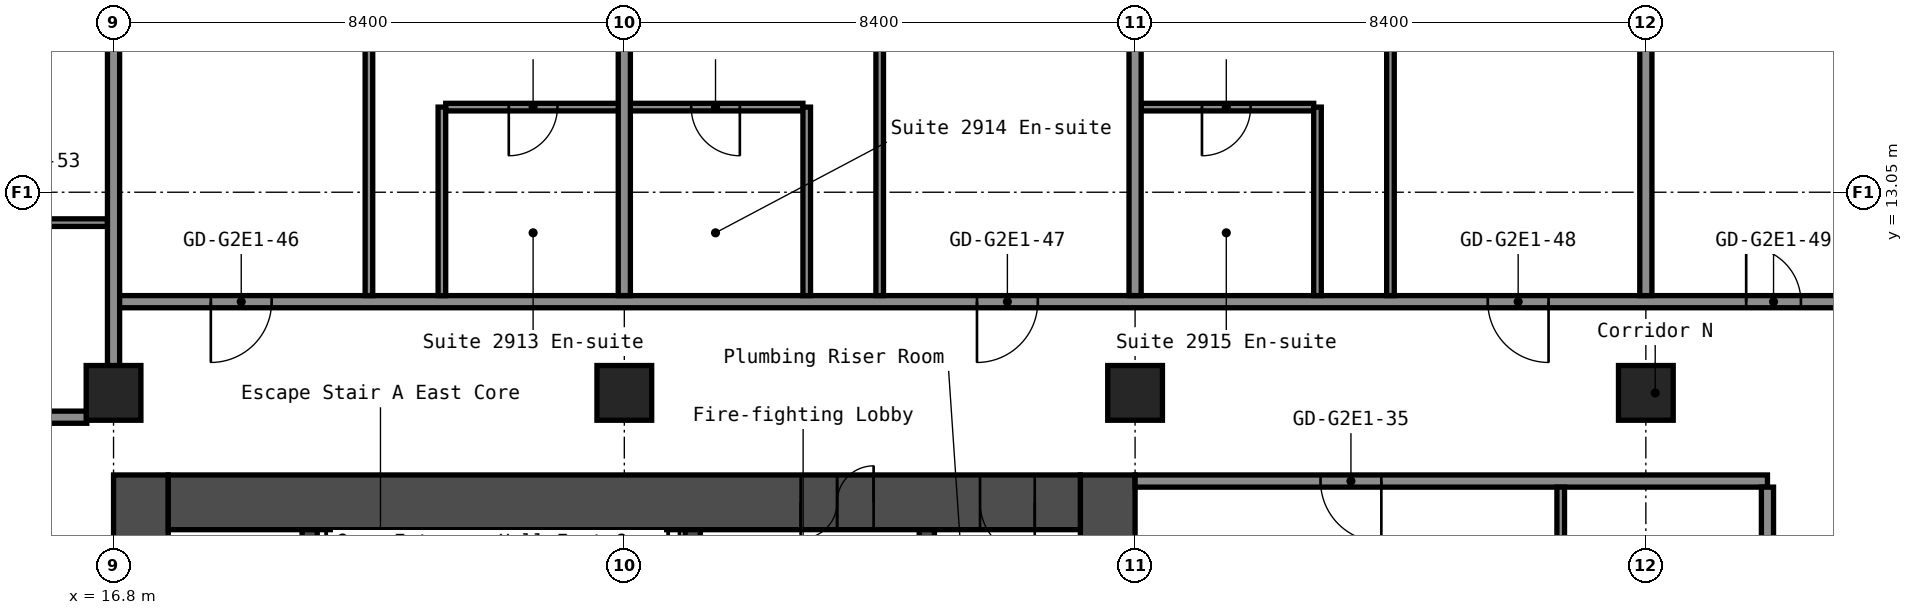
"""IFC4 building model, lengths in metres.
Left out: names, types, materials, properties, quantities, classifications, styles, units other than length and angle.
Written with IfcOpenShell. Run it as: python <this file> out.ifc"""

import sys

from ifc_helpers import new_model, si_unit, direction, frame, frame_2d, origin, origin_2d, place, context, subcontext, project, spatial, rectangle, hollow_rectangle, extrude, element, fill, save


model = new_model("IFC4")
c1 = context("Model", 3, precision=1e-05, world=origin(), true_north=direction((0.0, 1.0)))
c2 = subcontext(c1, "Body", "Model", "MODEL_VIEW")
j1 = project(units=[si_unit("LENGTHUNIT", "METRE"), si_unit("PLANEANGLEUNIT", "RADIAN")], contexts=[c1])
p1 = place(None, origin())
s1 = spatial("IfcSite", under=j1, at=p1, CompositionType="ELEMENT")
p2 = place(p1, origin())
s2 = spatial("IfcBuilding", under=s1, at=p2, CompositionType="ELEMENT")
p3 = place(p2, frame((0.0, 0.0, 104.2)))
s3 = spatial("IfcBuildingStorey", under=s2, at=p3, CompositionType="ELEMENT", Elevation=104.2)
for number, where, z_axis, x_axis in (
    (1, (16.8, 9.75, 0.0), (0.0, 0.0, 1.0), (1.0, 0.0, 0.0)),
    (2, (25.2, 9.75, 0.0), (0.0, 0.0, 1.0), (1.0, 0.0, 0.0)),
    (3, (33.6, 9.75, 0.0), (0.0, 0.0, 1.0), (1.0, 0.0, 0.0)),
    (4, (42.0, 9.75, 0.0), (0.0, 0.0, 1.0), (1.0, 0.0, 0.0)),
):
    element("IfcColumn", number, at=place(p3, frame(where, z_axis=z_axis, x_axis=x_axis)), inside=s3, PredefinedType="COLUMN", context=c2, shape_type="SweptSolid", body=[
        extrude(hollow_rectangle(XDim=0.9, YDim=0.9, WallThickness=0.036, at=origin_2d()), origin(), (0.0, 0.0, 1.0), 2.8),
    ])
p4 = place(p3, frame((17.25, -8.4, 0.0), z_axis=(0.0, 0.0, 1.0), x_axis=(0.0, 1.0, 0.0)))
e5 = element("IfcWall", 5, at=p4, inside=s3, PredefinedType="SHEAR", context=c2, shape_type="SweptSolid", body=[
    extrude(rectangle(XDim=16.8, YDim=0.9, at=frame_2d((8.4, 0.0))), origin(), (0.0, 0.0, 1.0), 2.8),
])
p5 = place(p4, frame((7.6, 0.0, 0.0)))
e6 = element("IfcOpeningElement", 6, at=p5, cuts=e5, PredefinedType="OPENING", context=c2, shape_type="SweptSolid", body=[
    extrude(rectangle(XDim=1.2, YDim=2.1, at=frame_2d((0.6, 1.05))), frame((0.0, 0.46, 0.0), z_axis=(0.0, -1.0, 0.0), x_axis=(1.0, 0.0, 0.0)), (0.0, 0.0, 1.0), 0.92),
])
p6 = place(p3, frame((33.15, -8.4, 0.0), z_axis=(0.0, 0.0, 1.0), x_axis=(0.0, 1.0, 0.0)))
e7 = element("IfcWall", 7, at=p6, inside=s3, PredefinedType="SHEAR", context=c2, shape_type="SweptSolid", body=[
    extrude(rectangle(XDim=16.8, YDim=0.9, at=frame_2d((8.4, 0.0))), origin(), (0.0, 0.0, 1.0), 2.8),
])
p7 = place(p3, frame((17.7, 7.95, 0.0), z_axis=(0.0, 0.0, 1.0), x_axis=(1.0, 0.0, 0.0)))
e8 = element("IfcWall", 8, at=p7, inside=s3, PredefinedType="SHEAR", context=c2, shape_type="SweptSolid", body=[
    extrude(rectangle(XDim=15.0, YDim=0.9, at=frame_2d((7.5, 0.0))), origin(), (0.0, 0.0, 1.0), 2.8),
])
p8 = place(p7, frame((10.4, 0.0, 0.0)))
e9 = element("IfcOpeningElement", 9, at=p8, cuts=e8, PredefinedType="OPENING", context=c2, shape_type="SweptSolid", body=[
    extrude(rectangle(XDim=1.2, YDim=2.1, at=frame_2d((0.6, 1.05))), frame((0.0, 0.46, 0.0), z_axis=(0.0, -1.0, 0.0), x_axis=(1.0, 0.0, 0.0)), (0.0, 0.0, 1.0), 0.92),
])
p9 = place(p7, frame((13.35, 0.0, 0.0)))
e10 = element("IfcOpeningElement", 10, at=p9, cuts=e8, PredefinedType="OPENING", context=c2, shape_type="SweptSolid", body=[
    extrude(rectangle(XDim=0.9, YDim=2.1, at=frame_2d((0.45, 1.05))), frame((0.0, 0.46, 0.0), z_axis=(0.0, -1.0, 0.0), x_axis=(1.0, 0.0, 0.0)), (0.0, 0.0, 1.0), 0.92),
])
p10 = place(p3, frame((20.025, 1.2, 0.0), z_axis=(0.0, 0.0, 1.0), x_axis=(0.0, 1.0, 0.0)))
e11 = element("IfcWall", 11, at=p10, inside=s3, PredefinedType="SHEAR", context=c2, shape_type="SweptSolid", body=[
    extrude(rectangle(XDim=6.3, YDim=0.25, at=frame_2d((3.15, 0.0))), origin(), (0.0, 0.0, 1.0), 2.8),
])
p11 = place(p3, frame((26.325, 3.75, 0.0), z_axis=(0.0, 0.0, 1.0), x_axis=(0.0, 1.0, 0.0)))
e12 = element("IfcWall", 12, at=p11, inside=s3, PredefinedType="SHEAR", context=c2, shape_type="SweptSolid", body=[
    extrude(rectangle(XDim=3.75, YDim=0.25, at=frame_2d((1.875, 0.0))), origin(), (0.0, 0.0, 1.0), 2.8),
])
p12 = place(p11, frame((1.25, 0.0, 0.0)))
e13 = element("IfcOpeningElement", 13, at=p12, cuts=e12, PredefinedType="OPENING", context=c2, shape_type="SweptSolid", body=[
    extrude(rectangle(XDim=1.2, YDim=2.1, at=frame_2d((0.6, 1.05))), frame((0.0, 0.135, 0.0), z_axis=(0.0, -1.0, 0.0), x_axis=(1.0, 0.0, 0.0)), (0.0, 0.0, 1.0), 0.27),
])
p13 = place(p3, frame((30.175, 1.45, 0.0), z_axis=(0.0, 0.0, 1.0), x_axis=(0.0, 1.0, 0.0)))
e14 = element("IfcWall", 14, at=p13, inside=s3, PredefinedType="SHEAR", context=c2, shape_type="SweptSolid", body=[
    extrude(rectangle(XDim=6.05, YDim=0.25, at=frame_2d((3.025, 0.0))), origin(), (0.0, 0.0, 1.0), 2.8),
])
p14 = place(p13, frame((2.625, 0.0, 0.0)))
e15 = element("IfcOpeningElement", 15, at=p14, cuts=e14, PredefinedType="OPENING", context=c2, shape_type="SweptSolid", body=[
    extrude(rectangle(XDim=1.1, YDim=2.1, at=frame_2d((0.55, 1.05))), frame((0.0, 0.135, 0.0), z_axis=(0.0, -1.0, 0.0), x_axis=(1.0, 0.0, 0.0)), (0.0, 0.0, 1.0), 0.27),
])
p15 = place(p3, frame((33.6, 8.3, 0.0), z_axis=(0.0, 0.0, 1.0), x_axis=(1.0, 0.0, 0.0)))
e16 = element("IfcWall", 16, at=p15, inside=s3, PredefinedType="PARTITIONING", context=c2, shape_type="SweptSolid", body=[
    extrude(rectangle(XDim=10.4, YDim=0.2, at=frame_2d((5.2, 0.0))), origin(), (0.0, 0.0, 1.0), 2.8),
])
p16 = place(p15, frame((3.05, 0.0, 0.0)))
e17 = element("IfcOpeningElement", 17, at=p16, cuts=e16, PredefinedType="OPENING", context=c2, shape_type="SweptSolid", body=[
    extrude(rectangle(XDim=1.0, YDim=2.1, at=frame_2d((0.5, 1.05))), frame((0.0, 0.11, 0.0), z_axis=(0.0, -1.0, 0.0), x_axis=(1.0, 0.0, 0.0)), (0.0, 0.0, 1.0), 0.22),
])
p17 = place(p3, frame((-16.36, 9.35, 0.0), z_axis=(0.0, 0.0, 1.0), x_axis=(1.0, 0.0, 0.0)))
e18 = element("IfcWall", 18, at=p17, inside=s3, PredefinedType="PARTITIONING", context=c2, shape_type="SweptSolid", body=[
    extrude(rectangle(XDim=32.72, YDim=0.2, at=frame_2d((16.36, 0.0))), origin(), (0.0, 0.0, 1.0), 2.8),
])
p18 = place(p17, frame((5.36, 0.0, 0.0)))
e19 = element("IfcOpeningElement", 19, at=p18, cuts=e18, PredefinedType="OPENING", context=c2, shape_type="SweptSolid", body=[
    extrude(rectangle(XDim=1.0, YDim=2.1, at=frame_2d((0.5, 1.05))), frame((0.0, 0.11, 0.0), z_axis=(0.0, -1.0, 0.0), x_axis=(1.0, 0.0, 0.0)), (0.0, 0.0, 1.0), 0.22),
])
p19 = place(p17, frame((13.76, 0.0, 0.0)))
e20 = element("IfcOpeningElement", 20, at=p19, cuts=e18, PredefinedType="OPENING", context=c2, shape_type="SweptSolid", body=[
    extrude(rectangle(XDim=1.0, YDim=2.1, at=frame_2d((0.5, 1.05))), frame((0.0, 0.11, 0.0), z_axis=(0.0, -1.0, 0.0), x_axis=(1.0, 0.0, 0.0)), (0.0, 0.0, 1.0), 0.22),
])
p20 = place(p17, frame((22.16, 0.0, 0.0)))
e21 = element("IfcOpeningElement", 21, at=p20, cuts=e18, PredefinedType="OPENING", context=c2, shape_type="SweptSolid", body=[
    extrude(rectangle(XDim=1.0, YDim=2.1, at=frame_2d((0.5, 1.05))), frame((0.0, 0.11, 0.0), z_axis=(0.0, -1.0, 0.0), x_axis=(1.0, 0.0, 0.0)), (0.0, 0.0, 1.0), 0.22),
])
p21 = place(p17, frame((26.36, 0.0, 0.0)))
e22 = element("IfcOpeningElement", 22, at=p21, cuts=e18, PredefinedType="OPENING", context=c2, shape_type="SweptSolid", body=[
    extrude(rectangle(XDim=1.0, YDim=2.1, at=frame_2d((0.5, 1.05))), frame((0.0, 0.11, 0.0), z_axis=(0.0, -1.0, 0.0), x_axis=(1.0, 0.0, 0.0)), (0.0, 0.0, 1.0), 0.22),
])
p22 = place(p3, frame((16.8, 11.25, 0.0), z_axis=(0.0, 0.0, 1.0), x_axis=(1.0, 0.0, 0.0)))
e23 = element("IfcWall", 23, at=p22, inside=s3, PredefinedType="PARTITIONING", context=c2, shape_type="SweptSolid", body=[
    extrude(rectangle(XDim=29.7, YDim=0.2, at=frame_2d((14.85, 0.0))), origin(), (0.0, 0.0, 1.0), 2.8),
])
p23 = place(p22, frame((1.6, 0.0, 0.0)))
e24 = element("IfcOpeningElement", 24, at=p23, cuts=e23, PredefinedType="OPENING", context=c2, shape_type="SweptSolid", body=[
    extrude(rectangle(XDim=1.0, YDim=2.1, at=frame_2d((0.5, 1.05))), frame((0.0, 0.11, 0.0), z_axis=(0.0, -1.0, 0.0), x_axis=(1.0, 0.0, 0.0)), (0.0, 0.0, 1.0), 0.22),
])
p24 = place(p22, frame((14.2, 0.0, 0.0)))
e25 = element("IfcOpeningElement", 25, at=p24, cuts=e23, PredefinedType="OPENING", context=c2, shape_type="SweptSolid", body=[
    extrude(rectangle(XDim=1.0, YDim=2.1, at=frame_2d((0.5, 1.05))), frame((0.0, 0.11, 0.0), z_axis=(0.0, -1.0, 0.0), x_axis=(1.0, 0.0, 0.0)), (0.0, 0.0, 1.0), 0.22),
])
p25 = place(p22, frame((22.6, 0.0, 0.0)))
e26 = element("IfcOpeningElement", 26, at=p25, cuts=e23, PredefinedType="OPENING", context=c2, shape_type="SweptSolid", body=[
    extrude(rectangle(XDim=1.0, YDim=2.1, at=frame_2d((0.5, 1.05))), frame((0.0, 0.11, 0.0), z_axis=(0.0, -1.0, 0.0), x_axis=(1.0, 0.0, 0.0)), (0.0, 0.0, 1.0), 0.22),
])
p26 = place(p22, frame((26.85, 0.0, 0.0)))
e27 = element("IfcOpeningElement", 27, at=p26, cuts=e23, PredefinedType="OPENING", context=c2, shape_type="SweptSolid", body=[
    extrude(rectangle(XDim=0.9, YDim=2.1, at=frame_2d((0.45, 1.05))), frame((0.0, 0.11, 0.0), z_axis=(0.0, -1.0, 0.0), x_axis=(1.0, 0.0, 0.0)), (0.0, 0.0, 1.0), 0.22),
])
p27 = place(p3, frame((13.863, 12.55, 0.0), z_axis=(0.0, 0.0, 1.0), x_axis=(1.0, 0.0, 0.0)))
e28 = element("IfcWall", 28, at=p27, inside=s3, PredefinedType="PARTITIONING", context=c2, shape_type="SweptSolid", body=[
    extrude(rectangle(XDim=2.837, YDim=0.125, at=frame_2d((1.419, 0.0))), origin(), (0.0, 0.0, 1.0), 2.8),
])
p28 = place(p27, frame((1.038, 0.0, 0.0)))
e29 = element("IfcOpeningElement", 29, at=p28, cuts=e28, PredefinedType="OPENING", context=c2, shape_type="SweptSolid", body=[
    extrude(rectangle(XDim=0.8, YDim=2.1, at=frame_2d((0.4, 1.05))), frame((0.0, 0.073, 0.0), z_axis=(0.0, -1.0, 0.0), x_axis=(1.0, 0.0, 0.0)), (0.0, 0.0, 1.0), 0.145),
])
p29 = place(p3, frame((22.262, 14.45, 0.0), z_axis=(0.0, 0.0, 1.0), x_axis=(1.0, 0.0, 0.0)))
e30 = element("IfcWall", 30, at=p29, inside=s3, PredefinedType="PARTITIONING", context=c2, shape_type="SweptSolid", body=[
    extrude(rectangle(XDim=5.875, YDim=0.125, at=frame_2d((2.938, 0.0))), origin(), (0.0, 0.0, 1.0), 2.8),
])
p30 = place(p29, frame((1.038, 0.0, 0.0)))
e31 = element("IfcOpeningElement", 31, at=p30, cuts=e30, PredefinedType="OPENING", context=c2, shape_type="SweptSolid", body=[
    extrude(rectangle(XDim=0.8, YDim=2.1, at=frame_2d((0.4, 1.05))), frame((0.0, 0.073, 0.0), z_axis=(0.0, -1.0, 0.0), x_axis=(1.0, 0.0, 0.0)), (0.0, 0.0, 1.0), 0.145),
])
p31 = place(p29, frame((4.038, 0.0, 0.0)))
e32 = element("IfcOpeningElement", 32, at=p31, cuts=e30, PredefinedType="OPENING", context=c2, shape_type="SweptSolid", body=[
    extrude(rectangle(XDim=0.8, YDim=2.1, at=frame_2d((0.4, 1.05))), frame((0.0, 0.073, 0.0), z_axis=(0.0, -1.0, 0.0), x_axis=(1.0, 0.0, 0.0)), (0.0, 0.0, 1.0), 0.145),
])
p32 = place(p3, frame((33.7, 14.45, 0.0), z_axis=(0.0, 0.0, 1.0), x_axis=(1.0, 0.0, 0.0)))
e33 = element("IfcWall", 33, at=p32, inside=s3, PredefinedType="PARTITIONING", context=c2, shape_type="SweptSolid", body=[
    extrude(rectangle(XDim=2.838, YDim=0.125, at=frame_2d((1.419, 0.0))), origin(), (0.0, 0.0, 1.0), 2.8),
])
p33 = place(p32, frame((1.0, 0.0, 0.0)))
e34 = element("IfcOpeningElement", 34, at=p33, cuts=e33, PredefinedType="OPENING", context=c2, shape_type="SweptSolid", body=[
    extrude(rectangle(XDim=0.8, YDim=2.1, at=frame_2d((0.4, 1.05))), frame((0.0, 0.073, 0.0), z_axis=(0.0, -1.0, 0.0), x_axis=(1.0, 0.0, 0.0)), (0.0, 0.0, 1.0), 0.145),
])
p34 = place(p3, frame((16.8, 10.19, 0.0), z_axis=(0.0, 0.0, 1.0), x_axis=(0.0, 1.0, 0.0)))
e35 = element("IfcWall", 35, at=p34, inside=s3, PredefinedType="PARTITIONING", context=c2, shape_type="SweptSolid", body=[
    extrude(rectangle(XDim=13.36, YDim=0.2, at=frame_2d((6.68, 0.0))), origin(), (0.0, 0.0, 1.0), 2.8),
])
p35 = place(p3, frame((21.0, 11.35, 0.0), z_axis=(0.0, 0.0, 1.0), x_axis=(0.0, 1.0, 0.0)))
e36 = element("IfcWall", 36, at=p35, inside=s3, PredefinedType="PARTITIONING", context=c2, shape_type="SweptSolid", body=[
    extrude(rectangle(XDim=12.2, YDim=0.125, at=frame_2d((6.1, 0.0))), origin(), (0.0, 0.0, 1.0), 2.8),
])
p36 = place(p35, frame((4.05, 0.0, 0.0)))
e37 = element("IfcOpeningElement", 37, at=p36, cuts=e36, PredefinedType="OPENING", context=c2, shape_type="SweptSolid", body=[
    extrude(rectangle(XDim=0.9, YDim=2.1, at=frame_2d((0.45, 1.05))), frame((0.0, 0.073, 0.0), z_axis=(0.0, -1.0, 0.0), x_axis=(1.0, 0.0, 0.0)), (0.0, 0.0, 1.0), 0.145),
])
p37 = place(p3, frame((22.2, 11.35, 0.0), z_axis=(0.0, 0.0, 1.0), x_axis=(0.0, 1.0, 0.0)))
e38 = element("IfcWall", 38, at=p37, inside=s3, PredefinedType="PARTITIONING", context=c2, shape_type="SweptSolid", body=[
    extrude(rectangle(XDim=3.1, YDim=0.125, at=frame_2d((1.55, 0.0))), origin(), (0.0, 0.0, 1.0), 2.8),
])
p38 = place(p3, frame((25.2, 11.35, 0.0), z_axis=(0.0, 0.0, 1.0), x_axis=(0.0, 1.0, 0.0)))
e39 = element("IfcWall", 39, at=p38, inside=s3, PredefinedType="PARTITIONING", context=c2, shape_type="SweptSolid", body=[
    extrude(rectangle(XDim=12.2, YDim=0.2, at=frame_2d((6.1, 0.0))), origin(), (0.0, 0.0, 1.0), 2.8),
])
p39 = place(p3, frame((28.2, 11.35, 0.0), z_axis=(0.0, 0.0, 1.0), x_axis=(0.0, 1.0, 0.0)))
e40 = element("IfcWall", 40, at=p39, inside=s3, PredefinedType="PARTITIONING", context=c2, shape_type="SweptSolid", body=[
    extrude(rectangle(XDim=3.1, YDim=0.125, at=frame_2d((1.55, 0.0))), origin(), (0.0, 0.0, 1.0), 2.8),
])
p40 = place(p3, frame((29.4, 11.35, 0.0), z_axis=(0.0, 0.0, 1.0), x_axis=(0.0, 1.0, 0.0)))
e41 = element("IfcWall", 41, at=p40, inside=s3, PredefinedType="PARTITIONING", context=c2, shape_type="SweptSolid", body=[
    extrude(rectangle(XDim=12.2, YDim=0.125, at=frame_2d((6.1, 0.0))), origin(), (0.0, 0.0, 1.0), 2.8),
])
p41 = place(p40, frame((4.05, 0.0, 0.0)))
e42 = element("IfcOpeningElement", 42, at=p41, cuts=e41, PredefinedType="OPENING", context=c2, shape_type="SweptSolid", body=[
    extrude(rectangle(XDim=0.9, YDim=2.1, at=frame_2d((0.45, 1.05))), frame((0.0, 0.073, 0.0), z_axis=(0.0, -1.0, 0.0), x_axis=(1.0, 0.0, 0.0)), (0.0, 0.0, 1.0), 0.145),
])
p42 = place(p3, frame((33.6, 11.35, 0.0), z_axis=(0.0, 0.0, 1.0), x_axis=(0.0, 1.0, 0.0)))
e43 = element("IfcWall", 43, at=p42, inside=s3, PredefinedType="PARTITIONING", context=c2, shape_type="SweptSolid", body=[
    extrude(rectangle(XDim=12.2, YDim=0.2, at=frame_2d((6.1, 0.0))), origin(), (0.0, 0.0, 1.0), 2.8),
])
p43 = place(p3, frame((36.6, 11.35, 0.0), z_axis=(0.0, 0.0, 1.0), x_axis=(0.0, 1.0, 0.0)))
e44 = element("IfcWall", 44, at=p43, inside=s3, PredefinedType="PARTITIONING", context=c2, shape_type="SweptSolid", body=[
    extrude(rectangle(XDim=3.1, YDim=0.125, at=frame_2d((1.55, 0.0))), origin(), (0.0, 0.0, 1.0), 2.8),
])
p44 = place(p3, frame((37.8, 11.35, 0.0), z_axis=(0.0, 0.0, 1.0), x_axis=(0.0, 1.0, 0.0)))
e45 = element("IfcWall", 45, at=p44, inside=s3, PredefinedType="PARTITIONING", context=c2, shape_type="SweptSolid", body=[
    extrude(rectangle(XDim=12.2, YDim=0.125, at=frame_2d((6.1, 0.0))), origin(), (0.0, 0.0, 1.0), 2.8),
])
p45 = place(p44, frame((4.05, 0.0, 0.0)))
e46 = element("IfcOpeningElement", 46, at=p45, cuts=e45, PredefinedType="OPENING", context=c2, shape_type="SweptSolid", body=[
    extrude(rectangle(XDim=0.9, YDim=2.1, at=frame_2d((0.45, 1.05))), frame((0.0, 0.073, 0.0), z_axis=(0.0, -1.0, 0.0), x_axis=(1.0, 0.0, 0.0)), (0.0, 0.0, 1.0), 0.145),
])
p46 = place(p3, frame((40.6, 4.9, 0.0), z_axis=(0.0, 0.0, 1.0), x_axis=(0.0, 1.0, 0.0)))
e47 = element("IfcWall", 47, at=p46, inside=s3, PredefinedType="PARTITIONING", context=c2, shape_type="SweptSolid", body=[
    extrude(rectangle(XDim=3.3, YDim=0.125, at=frame_2d((1.65, 0.0))), origin(), (0.0, 0.0, 1.0), 2.8),
])
p47 = place(p3, frame((42.0, 11.35, 0.0), z_axis=(0.0, 0.0, 1.0), x_axis=(0.0, 1.0, 0.0)))
e48 = element("IfcWall", 48, at=p47, inside=s3, PredefinedType="PARTITIONING", context=c2, shape_type="SweptSolid", body=[
    extrude(rectangle(XDim=12.2, YDim=0.2, at=frame_2d((6.1, 0.0))), origin(), (0.0, 0.0, 1.0), 2.8),
])
p48 = place(p3, frame((44.0, -8.2, 0.0), z_axis=(0.0, 0.0, 1.0), x_axis=(0.0, 1.0, 0.0)))
e49 = element("IfcWall", 49, at=p48, inside=s3, PredefinedType="PARTITIONING", context=c2, shape_type="SweptSolid", body=[
    extrude(rectangle(XDim=16.4, YDim=0.2, at=frame_2d((8.2, 0.0))), origin(), (0.0, 0.0, 1.0), 2.8),
])
p49 = place(p8, origin())
e50 = element("IfcDoor", 50, at=p49, inside=s3, OperationType="DOUBLE_DOOR_SINGLE_SWING", PredefinedType="DOOR", context=c2, shape_type="SweptSolid", body=[
    extrude(rectangle(XDim=1.2, YDim=2.1, at=frame_2d((0.6, 1.05))), frame((0.0, 0.025, 0.0), z_axis=(0.0, -1.0, 0.0), x_axis=(1.0, 0.0, 0.0)), (0.0, 0.0, 1.0), 0.05),
])
fill(e9, e50)
p50 = place(p9, origin())
e51 = element("IfcDoor", 51, at=p50, inside=s3, OperationType="SINGLE_SWING_RIGHT", PredefinedType="DOOR", context=c2, shape_type="SweptSolid", body=[
    extrude(rectangle(XDim=0.9, YDim=2.1, at=frame_2d((0.45, 1.05))), frame((0.0, 0.025, 0.0), z_axis=(0.0, -1.0, 0.0), x_axis=(1.0, 0.0, 0.0)), (0.0, 0.0, 1.0), 0.05),
])
fill(e10, e51)
p51 = place(p16, origin())
e52 = element("IfcDoor", 52, at=p51, inside=s3, OperationType="SINGLE_SWING_RIGHT", PredefinedType="DOOR", context=c2, shape_type="SweptSolid", body=[
    extrude(rectangle(XDim=1.0, YDim=2.1, at=frame_2d((0.5, 1.05))), frame((0.0, 0.025, 0.0), z_axis=(0.0, -1.0, 0.0), x_axis=(1.0, 0.0, 0.0)), (0.0, 0.0, 1.0), 0.05),
])
fill(e17, e52)
p52 = place(p23, origin())
e53 = element("IfcDoor", 53, at=p52, inside=s3, OperationType="SINGLE_SWING_LEFT", PredefinedType="DOOR", context=c2, shape_type="SweptSolid", body=[
    extrude(rectangle(XDim=1.0, YDim=2.1, at=frame_2d((0.5, 1.05))), frame((0.0, 0.025, 0.0), z_axis=(0.0, -1.0, 0.0), x_axis=(1.0, 0.0, 0.0)), (0.0, 0.0, 1.0), 0.05),
])
fill(e24, e53)
p53 = place(p24, origin())
e54 = element("IfcDoor", 54, at=p53, inside=s3, OperationType="SINGLE_SWING_LEFT", PredefinedType="DOOR", context=c2, shape_type="SweptSolid", body=[
    extrude(rectangle(XDim=1.0, YDim=2.1, at=frame_2d((0.5, 1.05))), frame((0.0, 0.025, 0.0), z_axis=(0.0, -1.0, 0.0), x_axis=(1.0, 0.0, 0.0)), (0.0, 0.0, 1.0), 0.05),
])
fill(e25, e54)
p54 = place(p25, origin())
e55 = element("IfcDoor", 55, at=p54, inside=s3, OperationType="SINGLE_SWING_RIGHT", PredefinedType="DOOR", context=c2, shape_type="SweptSolid", body=[
    extrude(rectangle(XDim=1.0, YDim=2.1, at=frame_2d((0.5, 1.05))), frame((0.0, 0.025, 0.0), z_axis=(0.0, -1.0, 0.0), x_axis=(1.0, 0.0, 0.0)), (0.0, 0.0, 1.0), 0.05),
])
fill(e26, e55)
p55 = place(p26, origin())
e56 = element("IfcDoor", 56, at=p55, inside=s3, OperationType="SINGLE_SWING_RIGHT", PredefinedType="DOOR", context=c2, shape_type="SweptSolid", body=[
    extrude(rectangle(XDim=0.9, YDim=2.1, at=frame_2d((0.45, 1.05))), frame((0.0, 0.025, 0.0), z_axis=(0.0, -1.0, 0.0), x_axis=(1.0, 0.0, 0.0)), (0.0, 0.0, 1.0), 0.05),
])
fill(e27, e56)
p56 = place(p30, origin())
e57 = element("IfcDoor", 57, at=p56, inside=s3, OperationType="SINGLE_SWING_LEFT", PredefinedType="DOOR", context=c2, shape_type="SweptSolid", body=[
    extrude(rectangle(XDim=0.8, YDim=2.1, at=frame_2d((0.4, 1.05))), frame((0.0, 0.025, 0.0), z_axis=(0.0, -1.0, 0.0), x_axis=(1.0, 0.0, 0.0)), (0.0, 0.0, 1.0), 0.05),
])
fill(e31, e57)
p57 = place(p31, origin())
e58 = element("IfcDoor", 58, at=p57, inside=s3, OperationType="SINGLE_SWING_RIGHT", PredefinedType="DOOR", context=c2, shape_type="SweptSolid", body=[
    extrude(rectangle(XDim=0.8, YDim=2.1, at=frame_2d((0.4, 1.05))), frame((0.0, 0.025, 0.0), z_axis=(0.0, -1.0, 0.0), x_axis=(1.0, 0.0, 0.0)), (0.0, 0.0, 1.0), 0.05),
])
fill(e32, e58)
p58 = place(p33, origin())
e59 = element("IfcDoor", 59, at=p58, inside=s3, OperationType="SINGLE_SWING_LEFT", PredefinedType="DOOR", context=c2, shape_type="SweptSolid", body=[
    extrude(rectangle(XDim=0.8, YDim=2.1, at=frame_2d((0.4, 1.05))), frame((0.0, 0.025, 0.0), z_axis=(0.0, -1.0, 0.0), x_axis=(1.0, 0.0, 0.0)), (0.0, 0.0, 1.0), 0.05),
])
fill(e34, e59)
save(model, sys.argv[1])
